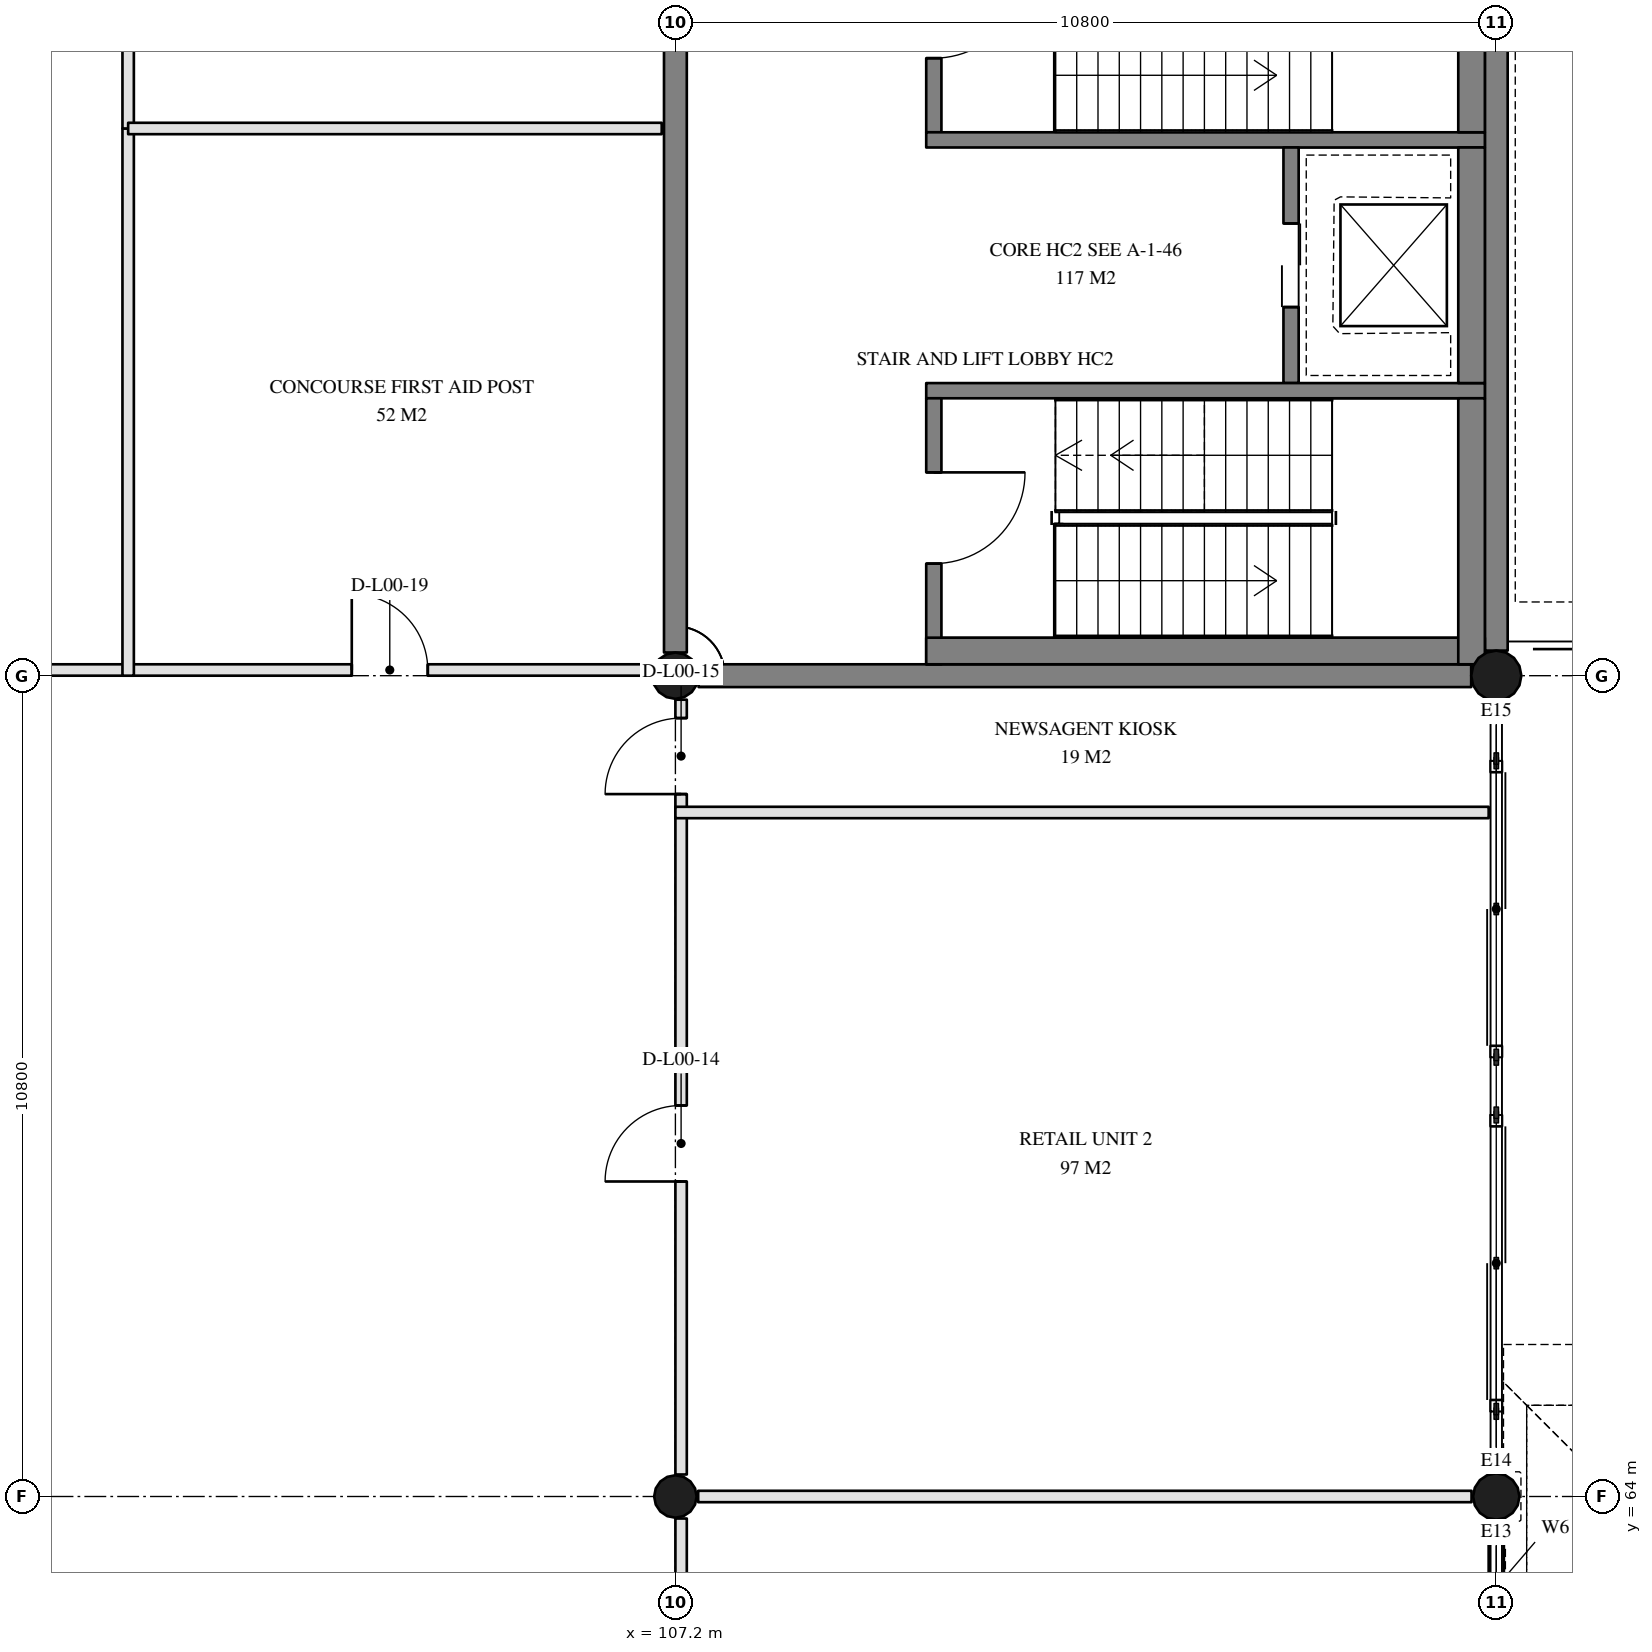
"""IFC4 building model, lengths in metres.
Left out: names, types, materials, properties, quantities, classifications, styles, units other than length and angle.
Written with IfcOpenShell. Run it as: python <this file> out.ifc"""

import sys

from ifc_helpers import new_model, si_unit, direction, frame, frame_2d, origin, origin_2d, place, context, subcontext, project, spatial, rectangle, hollow_circle, extrude, element, fill, save


model = new_model("IFC4")
c1 = context("Model", 3, precision=1e-05, world=origin(), true_north=direction((0.0, 1.0)))
c2 = subcontext(c1, "Body", "Model", "MODEL_VIEW")
j1 = project(units=[si_unit("LENGTHUNIT", "METRE"), si_unit("PLANEANGLEUNIT", "RADIAN")], contexts=[c1])
p1 = place(None, origin())
s1 = spatial("IfcSite", under=j1, at=p1, CompositionType="ELEMENT")
p2 = place(p1, origin())
s2 = spatial("IfcBuilding", under=s1, at=p2, CompositionType="ELEMENT")
p3 = place(p2, origin())
s3 = spatial("IfcBuildingStorey", under=s2, at=p3, CompositionType="ELEMENT", Elevation=0.0)
p4 = place(p3, frame((107.2, 64.0, 0.0), z_axis=(0.0, 0.0, 1.0), x_axis=(1.0, 0.0, 0.0)))
e1 = element("IfcColumn", 1, at=p4, inside=s3, PredefinedType="COLUMN", context=c2, shape_type="SweptSolid", body=[
    extrude(hollow_circle(Radius=0.28, WallThickness=0.02, at=origin_2d()), origin(), (0.0, 0.0, 1.0), 4.8),
])
for number, where, z_axis, x_axis in (
    (2, (107.2, 74.8, 0.0), (0.0, 0.0, 1.0), (1.0, 0.0, 0.0)),
    (3, (118.0, 64.0, 0.0), (0.0, 0.0, 1.0), (1.0, 0.0, 0.0)),
):
    element("IfcColumn", number, at=place(p3, frame(where, z_axis=z_axis, x_axis=x_axis)), inside=s3, PredefinedType="COLUMN", context=c2, shape_type="SweptSolid", body=[
        extrude(hollow_circle(Radius=0.305, WallThickness=0.025, at=origin_2d()), origin(), (0.0, 0.0, 1.0), 4.8),
    ])
p5 = place(p3, frame((118.0, 74.8, 0.0), z_axis=(0.0, 0.0, 1.0), x_axis=(1.0, 0.0, 0.0)))
e4 = element("IfcColumn", 4, at=p5, inside=s3, PredefinedType="COLUMN", context=c2, shape_type="SweptSolid", body=[
    extrude(hollow_circle(Radius=0.33, WallThickness=0.025, at=origin_2d()), origin(), (0.0, 0.0, 1.0), 4.8),
])
p6 = place(p3, frame((107.505, 74.8, 0.0), z_axis=(0.0, 0.0, 1.0), x_axis=(1.0, 0.0, 0.0)))
e5 = element("IfcWall", 5, at=p6, inside=s3, PredefinedType="SOLIDWALL", context=c2, shape_type="SweptSolid", body=[
    extrude(rectangle(XDim=10.165, YDim=0.3, at=frame_2d((5.083, 0.0))), origin(), (0.0, 0.0, 1.0), 4.8),
])
p7 = place(p3, frame((118.0, 75.13, 0.0), z_axis=(0.0, 0.0, 1.0), x_axis=(0.0, 1.0, 0.0)))
e6 = element("IfcWall", 6, at=p7, inside=s3, PredefinedType="SOLIDWALL", context=c2, shape_type="SweptSolid", body=[
    extrude(rectangle(XDim=10.14, YDim=0.3, at=frame_2d((5.07, 0.0))), origin(), (0.0, 0.0, 1.0), 4.8),
])
p8 = place(p3, frame((107.2, 85.27, 0.0), z_axis=(0.0, 0.0, 1.0), x_axis=(0.0, -1.0, 0.0)))
e7 = element("IfcWall", 7, at=p8, inside=s3, PredefinedType="SOLIDWALL", context=c2, shape_type="SweptSolid", body=[
    extrude(rectangle(XDim=10.165, YDim=0.3, at=frame_2d((5.083, 0.0))), origin(), (0.0, 0.0, 1.0), 4.8),
])
p9 = place(p3, frame((118.0, 53.48, 4.5), z_axis=(0.0, 0.0, 1.0), x_axis=(0.0, 1.0, 0.0)))
e8 = element("IfcWall", 8, at=p9, inside=s3, PredefinedType="SOLIDWALL", context=c2, shape_type="SweptSolid", body=[
    extrude(rectangle(XDim=10.24, YDim=0.2, at=frame_2d((5.12, 0.0))), origin(), (0.0, 0.0, 1.0), 0.3),
])
p10 = place(p3, frame((118.0, 65.12, 0.0), z_axis=(0.0, 0.0, 1.0), x_axis=(0.0, 1.0, 0.0)))
e9 = element("IfcWall", 9, at=p10, inside=s3, PredefinedType="SOLIDWALL", context=c2, shape_type="SweptSolid", body=[
    extrude(rectangle(XDim=3.9, YDim=0.15, at=frame_2d((1.95, 0.0))), origin(), (0.0, 0.0, 1.0), 2.6),
])
p11 = place(p10, frame((0.15, 0.0, 0.0)))
e10 = element("IfcOpeningElement", 10, at=p11, cuts=e9, PredefinedType="OPENING", context=c2, shape_type="SweptSolid", body=[
    extrude(rectangle(XDim=3.6, YDim=2.4, at=frame_2d((1.8, 1.2))), frame((0.0, 0.085, 0.0), z_axis=(0.0, -1.0, 0.0), x_axis=(1.0, 0.0, 0.0)), (0.0, 0.0, 1.0), 0.17),
])
p12 = place(p3, frame((118.0, 69.78, 0.0), z_axis=(0.0, 0.0, 1.0), x_axis=(0.0, 1.0, 0.0)))
e11 = element("IfcWall", 11, at=p12, inside=s3, PredefinedType="SOLIDWALL", context=c2, shape_type="SweptSolid", body=[
    extrude(rectangle(XDim=3.9, YDim=0.15, at=frame_2d((1.95, 0.0))), origin(), (0.0, 0.0, 1.0), 2.6),
])
p13 = place(p12, frame((0.15, 0.0, 0.0)))
e12 = element("IfcOpeningElement", 12, at=p13, cuts=e11, PredefinedType="OPENING", context=c2, shape_type="SweptSolid", body=[
    extrude(rectangle(XDim=3.6, YDim=2.4, at=frame_2d((1.8, 1.2))), frame((0.0, 0.085, 0.0), z_axis=(0.0, -1.0, 0.0), x_axis=(1.0, 0.0, 0.0)), (0.0, 0.0, 1.0), 0.17),
])
p14 = place(p3, frame((110.6, 85.45, 0.0), z_axis=(0.0, 0.0, 1.0), x_axis=(0.0, -1.0, 0.0)))
e13 = element("IfcWall", 13, at=p14, inside=s3, PredefinedType="SOLIDWALL", context=c2, shape_type="SweptSolid", body=[
    extrude(rectangle(XDim=3.5, YDim=0.2, at=frame_2d((1.75, 0.0))), origin(), (0.0, 0.0, 1.0), 4.4),
])
p15 = place(p14, frame((1.325, 0.0, 0.0)))
e14 = element("IfcOpeningElement", 14, at=p15, cuts=e13, PredefinedType="OPENING", context=c2, shape_type="SweptSolid", body=[
    extrude(rectangle(XDim=1.2, YDim=2.1, at=frame_2d((0.6, 1.05))), frame((0.0, 0.11, 0.0), z_axis=(0.0, -1.0, 0.0), x_axis=(1.0, 0.0, 0.0)), (0.0, 0.0, 1.0), 0.22),
])
p16 = place(p3, frame((110.5, 81.85, 0.0), z_axis=(0.0, 0.0, 1.0), x_axis=(1.0, 0.0, 0.0)))
e15 = element("IfcWall", 15, at=p16, inside=s3, PredefinedType="SOLIDWALL", context=c2, shape_type="SweptSolid", body=[
    extrude(rectangle(XDim=7.35, YDim=0.2, at=frame_2d((3.675, 0.0))), origin(), (0.0, 0.0, 1.0), 4.4),
])
p17 = place(p3, frame((115.3, 81.75, 0.0), z_axis=(0.0, 0.0, 1.0), x_axis=(0.0, -1.0, 0.0)))
e16 = element("IfcWall", 16, at=p17, inside=s3, PredefinedType="SOLIDWALL", context=c2, shape_type="SweptSolid", body=[
    extrude(rectangle(XDim=3.1, YDim=0.2, at=frame_2d((1.55, 0.0))), origin(), (0.0, 0.0, 1.0), 4.4),
])
p18 = place(p17, frame((1.0, 0.0, 0.0)))
e17 = element("IfcOpeningElement", 17, at=p18, cuts=e16, PredefinedType="OPENING", context=c2, shape_type="SweptSolid", body=[
    extrude(rectangle(XDim=1.1, YDim=2.1, at=frame_2d((0.55, 1.05))), frame((0.0, 0.11, 0.0), z_axis=(0.0, -1.0, 0.0), x_axis=(1.0, 0.0, 0.0)), (0.0, 0.0, 1.0), 0.22),
])
p19 = place(p3, frame((110.5, 78.55, 0.0), z_axis=(0.0, 0.0, 1.0), x_axis=(1.0, 0.0, 0.0)))
e18 = element("IfcWall", 18, at=p19, inside=s3, PredefinedType="SOLIDWALL", context=c2, shape_type="SweptSolid", body=[
    extrude(rectangle(XDim=7.35, YDim=0.2, at=frame_2d((3.675, 0.0))), origin(), (0.0, 0.0, 1.0), 4.4),
])
p20 = place(p3, frame((110.6, 78.45, 0.0), z_axis=(0.0, 0.0, 1.0), x_axis=(0.0, -1.0, 0.0)))
e19 = element("IfcWall", 19, at=p20, inside=s3, PredefinedType="SOLIDWALL", context=c2, shape_type="SweptSolid", body=[
    extrude(rectangle(XDim=3.5, YDim=0.2, at=frame_2d((1.75, 0.0))), origin(), (0.0, 0.0, 1.0), 4.4),
])
p21 = place(p20, frame((0.975, 0.0, 0.0)))
e20 = element("IfcOpeningElement", 20, at=p21, cuts=e19, PredefinedType="OPENING", context=c2, shape_type="SweptSolid", body=[
    extrude(rectangle(XDim=1.2, YDim=2.1, at=frame_2d((0.6, 1.05))), frame((0.0, 0.11, 0.0), z_axis=(0.0, -1.0, 0.0), x_axis=(1.0, 0.0, 0.0)), (0.0, 0.0, 1.0), 0.22),
])
p22 = place(p3, frame((117.675, 85.45, -0.6), z_axis=(0.0, 0.0, 1.0), x_axis=(0.0, -1.0, 0.0)))
e21 = element("IfcWall", 21, at=p22, inside=s3, PredefinedType="SOLIDWALL", context=c2, shape_type="SweptSolid", body=[
    extrude(rectangle(XDim=3.5, YDim=0.35, at=frame_2d((1.75, 0.0))), origin(), (0.0, 0.0, 1.0), 5.0),
])
p23 = place(p3, frame((110.5, 75.125, -0.6), z_axis=(0.0, 0.0, 1.0), x_axis=(1.0, 0.0, 0.0)))
e22 = element("IfcWall", 22, at=p23, inside=s3, PredefinedType="SOLIDWALL", context=c2, shape_type="SweptSolid", body=[
    extrude(rectangle(XDim=7.35, YDim=0.35, at=frame_2d((3.675, 0.0))), origin(), (0.0, 0.0, 1.0), 5.0),
])
p24 = place(p3, frame((117.675, 78.45, -0.6), z_axis=(0.0, 0.0, 1.0), x_axis=(0.0, -1.0, 0.0)))
e23 = element("IfcWall", 23, at=p24, inside=s3, PredefinedType="SOLIDWALL", context=c2, shape_type="SweptSolid", body=[
    extrude(rectangle(XDim=3.5, YDim=0.35, at=frame_2d((1.75, 0.0))), origin(), (0.0, 0.0, 1.0), 5.0),
])
p25 = place(p3, frame((117.675, 81.75, -0.6), z_axis=(0.0, 0.0, 1.0), x_axis=(0.0, -1.0, 0.0)))
e24 = element("IfcWall", 24, at=p25, inside=s3, PredefinedType="SOLIDWALL", context=c2, shape_type="SweptSolid", body=[
    extrude(rectangle(XDim=3.1, YDim=0.35, at=frame_2d((1.55, 0.0))), origin(), (0.0, 0.0, 1.0), 5.0),
])
p26 = place(p3, frame((107.275, 56.8, 0.0), z_axis=(0.0, 0.0, 1.0), x_axis=(0.0, 1.0, 0.0)))
e25 = element("IfcWall", 25, at=p26, inside=s3, PredefinedType="PARTITIONING", context=c2, shape_type="SweptSolid", body=[
    extrude(rectangle(XDim=6.91, YDim=0.15, at=frame_2d((3.455, 0.0))), origin(), (0.0, 0.0, 1.0), 3.9),
])
p27 = place(p26, frame((2.555, 0.0, 0.0)))
e26 = element("IfcOpeningElement", 26, at=p27, cuts=e25, PredefinedType="OPENING", context=c2, shape_type="SweptSolid", body=[
    extrude(rectangle(XDim=1.8, YDim=2.1, at=frame_2d((0.9, 1.05))), frame((0.0, 0.085, 0.0), z_axis=(0.0, -1.0, 0.0), x_axis=(1.0, 0.0, 0.0)), (0.0, 0.0, 1.0), 0.17),
])
p28 = place(p3, frame((107.275, 64.29, 0.0), z_axis=(0.0, 0.0, 1.0), x_axis=(0.0, 1.0, 0.0)))
e27 = element("IfcWall", 27, at=p28, inside=s3, PredefinedType="PARTITIONING", context=c2, shape_type="SweptSolid", body=[
    extrude(rectangle(XDim=8.71, YDim=0.15, at=frame_2d((4.355, 0.0))), origin(), (0.0, 0.0, 1.0), 3.9),
])
p29 = place(p28, frame((3.855, 0.0, 0.0)))
e28 = element("IfcOpeningElement", 28, at=p29, cuts=e27, PredefinedType="OPENING", context=c2, shape_type="SweptSolid", body=[
    extrude(rectangle(XDim=1.0, YDim=2.1, at=frame_2d((0.5, 1.05))), frame((0.0, 0.085, 0.0), z_axis=(0.0, -1.0, 0.0), x_axis=(1.0, 0.0, 0.0)), (0.0, 0.0, 1.0), 0.17),
])
p30 = place(p3, frame((107.275, 73.0, 0.0), z_axis=(0.0, 0.0, 1.0), x_axis=(0.0, 1.0, 0.0)))
e29 = element("IfcWall", 29, at=p30, inside=s3, PredefinedType="PARTITIONING", context=c2, shape_type="SweptSolid", body=[
    extrude(rectangle(XDim=1.484, YDim=0.15, at=frame_2d((0.742, 0.0))), origin(), (0.0, 0.0, 1.0), 3.9),
])
p31 = place(p30, frame((0.242, 0.0, 0.0)))
e30 = element("IfcOpeningElement", 30, at=p31, cuts=e29, PredefinedType="OPENING", context=c2, shape_type="SweptSolid", body=[
    extrude(rectangle(XDim=1.0, YDim=2.1, at=frame_2d((0.5, 1.05))), frame((0.0, 0.085, 0.0), z_axis=(0.0, -1.0, 0.0), x_axis=(1.0, 0.0, 0.0)), (0.0, 0.0, 1.0), 0.17),
])
p32 = place(p3, frame((100.0, 74.875, 0.0), z_axis=(0.0, 0.0, 1.0), x_axis=(1.0, 0.0, 0.0)))
e31 = element("IfcWall", 31, at=p32, inside=s3, PredefinedType="PARTITIONING", context=c2, shape_type="SweptSolid", body=[
    extrude(rectangle(XDim=6.884, YDim=0.15, at=frame_2d((3.442, 0.0))), origin(), (0.0, 0.0, 1.0), 3.9),
])
p33 = place(p32, frame((2.942, 0.0, 0.0)))
e32 = element("IfcOpeningElement", 32, at=p33, cuts=e31, PredefinedType="OPENING", context=c2, shape_type="SweptSolid", body=[
    extrude(rectangle(XDim=1.0, YDim=2.1, at=frame_2d((0.5, 1.05))), frame((0.0, 0.085, 0.0), z_axis=(0.0, -1.0, 0.0), x_axis=(1.0, 0.0, 0.0)), (0.0, 0.0, 1.0), 0.17),
])
p34 = place(p3, frame((96.716, 74.875, 0.0), z_axis=(0.0, 0.0, 1.0), x_axis=(1.0, 0.0, 0.0)))
e33 = element("IfcWall", 33, at=p34, inside=s3, PredefinedType="PARTITIONING", context=c2, shape_type="SweptSolid", body=[
    extrude(rectangle(XDim=3.284, YDim=0.15, at=frame_2d((1.642, 0.0))), origin(), (0.0, 0.0, 1.0), 3.9),
])
p35 = place(p3, frame((107.5, 64.0, 0.0), z_axis=(0.0, 0.0, 1.0), x_axis=(1.0, 0.0, 0.0)))
e34 = element("IfcWall", 34, at=p35, inside=s3, PredefinedType="PARTITIONING", context=c2, shape_type="SweptSolid", body=[
    extrude(rectangle(XDim=10.176, YDim=0.15, at=frame_2d((5.088, 0.0))), origin(), (0.0, 0.0, 1.0), 3.9),
])
p36 = place(p3, frame((107.2, 73.0, 0.0), z_axis=(0.0, 0.0, 1.0), x_axis=(1.0, 0.0, 0.0)))
e35 = element("IfcWall", 35, at=p36, inside=s3, PredefinedType="PARTITIONING", context=c2, shape_type="SweptSolid", body=[
    extrude(rectangle(XDim=10.7, YDim=0.15, at=frame_2d((5.35, 0.0))), origin(), (0.0, 0.0, 1.0), 3.9),
])
p37 = place(p3, frame((100.0, 74.8, 0.0), z_axis=(0.0, 0.0, 1.0), x_axis=(0.0, 1.0, 0.0)))
e36 = element("IfcWall", 36, at=p37, inside=s3, PredefinedType="PARTITIONING", context=c2, shape_type="SweptSolid", body=[
    extrude(rectangle(XDim=7.2, YDim=0.15, at=frame_2d((3.6, 0.0))), origin(), (0.0, 0.0, 1.0), 3.9),
])
p38 = place(p3, frame((100.0, 82.0, 0.0), z_axis=(0.0, 0.0, 1.0), x_axis=(0.0, 1.0, 0.0)))
e37 = element("IfcWall", 37, at=p38, inside=s3, PredefinedType="PARTITIONING", context=c2, shape_type="SweptSolid", body=[
    extrude(rectangle(XDim=3.6, YDim=0.15, at=frame_2d((1.8, 0.0))), origin(), (0.0, 0.0, 1.0), 3.9),
])
p39 = place(p3, frame((100.0, 82.0, 0.0), z_axis=(0.0, 0.0, 1.0), x_axis=(1.0, 0.0, 0.0)))
e38 = element("IfcWall", 38, at=p39, inside=s3, PredefinedType="PARTITIONING", context=c2, shape_type="SweptSolid", body=[
    extrude(rectangle(XDim=7.02, YDim=0.15, at=frame_2d((3.51, 0.0))), origin(), (0.0, 0.0, 1.0), 4.4),
])
p40 = place(p11, origin())
e39 = element("IfcDoor", 39, at=p40, inside=s3, OperationType="DOUBLE_DOOR_SLIDING", PredefinedType="DOOR", context=c2, shape_type="SweptSolid", body=[
    extrude(rectangle(XDim=3.6, YDim=2.4, at=frame_2d((1.8, 1.2))), frame((0.0, 0.025, 0.0), z_axis=(0.0, -1.0, 0.0), x_axis=(1.0, 0.0, 0.0)), (0.0, 0.0, 1.0), 0.05),
])
fill(e10, e39)
p41 = place(p13, origin())
e40 = element("IfcDoor", 40, at=p41, inside=s3, OperationType="DOUBLE_DOOR_SLIDING", PredefinedType="DOOR", context=c2, shape_type="SweptSolid", body=[
    extrude(rectangle(XDim=3.6, YDim=2.4, at=frame_2d((1.8, 1.2))), frame((0.0, 0.025, 0.0), z_axis=(0.0, -1.0, 0.0), x_axis=(1.0, 0.0, 0.0)), (0.0, 0.0, 1.0), 0.05),
])
fill(e12, e40)
p42 = place(p18, frame((1.1, 0.0, 0.0), z_axis=(0.0, 0.0, 1.0), x_axis=(-1.0, 0.0, 0.0)))
e41 = element("IfcDoor", 41, at=p42, inside=s3, OperationType="DOUBLE_DOOR_SLIDING", PredefinedType="DOOR", context=c2, shape_type="SweptSolid", body=[
    extrude(rectangle(XDim=1.1, YDim=2.1, at=frame_2d((0.55, 1.05))), frame((0.0, 0.025, 0.0), z_axis=(0.0, -1.0, 0.0), x_axis=(1.0, 0.0, 0.0)), (0.0, 0.0, 1.0), 0.05),
])
fill(e17, e41)
p43 = place(p15, frame((1.2, 0.0, 0.0), z_axis=(0.0, 0.0, 1.0), x_axis=(-1.0, 0.0, 0.0)))
e42 = element("IfcDoor", 42, at=p43, inside=s3, OperationType="SINGLE_SWING_LEFT", PredefinedType="DOOR", context=c2, shape_type="SweptSolid", body=[
    extrude(rectangle(XDim=1.2, YDim=2.1, at=frame_2d((0.6, 1.05))), frame((0.0, 0.025, 0.0), z_axis=(0.0, -1.0, 0.0), x_axis=(1.0, 0.0, 0.0)), (0.0, 0.0, 1.0), 0.05),
])
fill(e14, e42)
p44 = place(p21, frame((1.2, 0.0, 0.0), z_axis=(0.0, 0.0, 1.0), x_axis=(-1.0, 0.0, 0.0)))
e43 = element("IfcDoor", 43, at=p44, inside=s3, OperationType="SINGLE_SWING_RIGHT", PredefinedType="DOOR", context=c2, shape_type="SweptSolid", body=[
    extrude(rectangle(XDim=1.2, YDim=2.1, at=frame_2d((0.6, 1.05))), frame((0.0, 0.025, 0.0), z_axis=(0.0, -1.0, 0.0), x_axis=(1.0, 0.0, 0.0)), (0.0, 0.0, 1.0), 0.05),
])
fill(e20, e43)
p45 = place(p29, frame((1.0, 0.0, 0.0), z_axis=(0.0, 0.0, 1.0), x_axis=(-1.0, 0.0, 0.0)))
e44 = element("IfcDoor", 44, at=p45, inside=s3, OperationType="SINGLE_SWING_RIGHT", PredefinedType="DOOR", context=c2, shape_type="SweptSolid", body=[
    extrude(rectangle(XDim=1.0, YDim=2.1, at=frame_2d((0.5, 1.05))), frame((0.0, 0.025, 0.0), z_axis=(0.0, -1.0, 0.0), x_axis=(1.0, 0.0, 0.0)), (0.0, 0.0, 1.0), 0.05),
])
fill(e28, e44)
p46 = place(p31, frame((1.0, 0.0, 0.0), z_axis=(0.0, 0.0, 1.0), x_axis=(-1.0, 0.0, 0.0)))
e45 = element("IfcDoor", 45, at=p46, inside=s3, OperationType="SINGLE_SWING_RIGHT", PredefinedType="DOOR", context=c2, shape_type="SweptSolid", body=[
    extrude(rectangle(XDim=1.0, YDim=2.1, at=frame_2d((0.5, 1.05))), frame((0.0, 0.025, 0.0), z_axis=(0.0, -1.0, 0.0), x_axis=(1.0, 0.0, 0.0)), (0.0, 0.0, 1.0), 0.05),
])
fill(e30, e45)
p47 = place(p33, origin())
e46 = element("IfcDoor", 46, at=p47, inside=s3, OperationType="SINGLE_SWING_LEFT", PredefinedType="DOOR", context=c2, shape_type="SweptSolid", body=[
    extrude(rectangle(XDim=1.0, YDim=2.1, at=frame_2d((0.5, 1.05))), frame((0.0, 0.025, 0.0), z_axis=(0.0, -1.0, 0.0), x_axis=(1.0, 0.0, 0.0)), (0.0, 0.0, 1.0), 0.05),
])
fill(e32, e46)
save(model, sys.argv[1])
